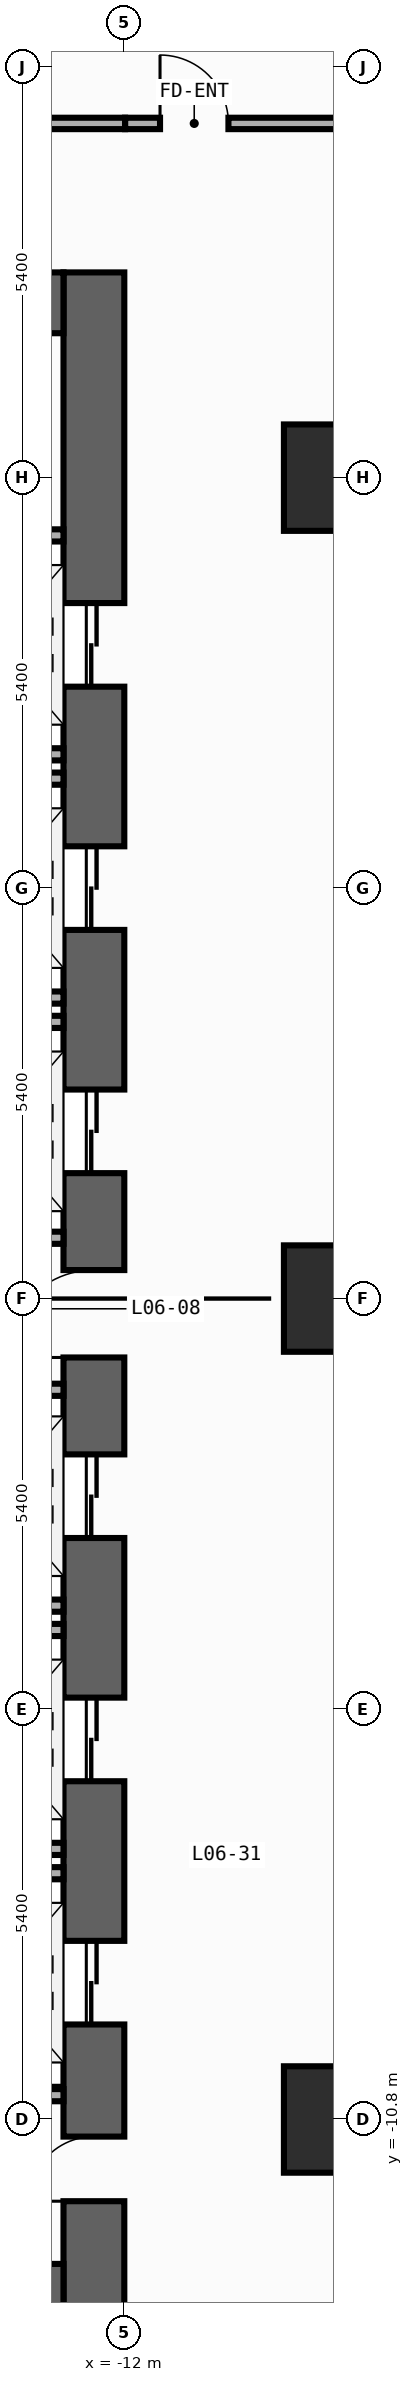
"""IFC4 building model, lengths in metres.
Left out: names, types, materials, properties, quantities, classifications, styles, units other than length and angle.
Written with IfcOpenShell. Run it as: python <this file> out.ifc"""

import sys

from ifc_helpers import new_model, si_unit, direction, frame, frame_2d, origin, origin_2d, place, context, subcontext, project, spatial, rectangle, extrude, element, fill, save


model = new_model("IFC4")
c1 = context("Model", 3, precision=1e-05, world=origin(), true_north=direction((0.0, 1.0)))
c2 = subcontext(c1, "Body", "Model", "MODEL_VIEW")
j1 = project(units=[si_unit("LENGTHUNIT", "METRE"), si_unit("PLANEANGLEUNIT", "RADIAN")], contexts=[c1])
p1 = place(None, origin())
s1 = spatial("IfcSite", under=j1, at=p1, CompositionType="ELEMENT")
p2 = place(p1, origin())
s2 = spatial("IfcBuilding", under=s1, at=p2, CompositionType="ELEMENT")
p3 = place(p2, frame((0.0, 0.0, 26.0)))
s3 = spatial("IfcBuildingStorey", under=s2, at=p3, CompositionType="ELEMENT", Elevation=26.0)
p4 = place(p3, frame((-12.4, -13.5, 0.0), z_axis=(0.0, 0.0, 1.0), x_axis=(0.0, 1.0, 0.0)))
e1 = element("IfcWall", 1, at=p4, inside=s3, PredefinedType="SHEAR", context=c2, shape_type="SweptSolid", body=[
    extrude(rectangle(XDim=27.0, YDim=0.8, at=frame_2d((13.5, 0.0))), origin(), (0.0, 0.0, 1.0), 3.94),
])
p5 = place(p4, frame((21.55, 0.0, 0.0)))
e2 = element("IfcOpeningElement", 2, at=p5, cuts=e1, PredefinedType="OPENING", context=c2, shape_type="SweptSolid", body=[
    extrude(rectangle(XDim=1.1, YDim=2.2, at=frame_2d((0.55, 1.1))), frame((0.0, 0.41, 0.0), z_axis=(0.0, -1.0, 0.0), x_axis=(1.0, 0.0, 0.0)), (0.0, 0.0, 1.0), 0.82),
])
p6 = place(p4, frame((18.35, 0.0, 0.0)))
e3 = element("IfcOpeningElement", 3, at=p6, cuts=e1, PredefinedType="OPENING", context=c2, shape_type="SweptSolid", body=[
    extrude(rectangle(XDim=1.1, YDim=2.2, at=frame_2d((0.55, 1.1))), frame((0.0, 0.41, 0.0), z_axis=(0.0, -1.0, 0.0), x_axis=(1.0, 0.0, 0.0)), (0.0, 0.0, 1.0), 0.82),
])
p7 = place(p4, frame((15.15, 0.0, 0.0)))
e4 = element("IfcOpeningElement", 4, at=p7, cuts=e1, PredefinedType="OPENING", context=c2, shape_type="SweptSolid", body=[
    extrude(rectangle(XDim=1.1, YDim=2.2, at=frame_2d((0.55, 1.1))), frame((0.0, 0.41, 0.0), z_axis=(0.0, -1.0, 0.0), x_axis=(1.0, 0.0, 0.0)), (0.0, 0.0, 1.0), 0.82),
])
p8 = place(p4, frame((10.35, 0.0, 0.0)))
e5 = element("IfcOpeningElement", 5, at=p8, cuts=e1, PredefinedType="OPENING", context=c2, shape_type="SweptSolid", body=[
    extrude(rectangle(XDim=1.1, YDim=2.2, at=frame_2d((0.55, 1.1))), frame((0.0, 0.41, 0.0), z_axis=(0.0, -1.0, 0.0), x_axis=(1.0, 0.0, 0.0)), (0.0, 0.0, 1.0), 0.82),
])
p9 = place(p4, frame((7.15, 0.0, 0.0)))
e6 = element("IfcOpeningElement", 6, at=p9, cuts=e1, PredefinedType="OPENING", context=c2, shape_type="SweptSolid", body=[
    extrude(rectangle(XDim=1.1, YDim=2.2, at=frame_2d((0.55, 1.1))), frame((0.0, 0.41, 0.0), z_axis=(0.0, -1.0, 0.0), x_axis=(1.0, 0.0, 0.0)), (0.0, 0.0, 1.0), 0.82),
])
p10 = place(p4, frame((3.95, 0.0, 0.0)))
e7 = element("IfcOpeningElement", 7, at=p10, cuts=e1, PredefinedType="OPENING", context=c2, shape_type="SweptSolid", body=[
    extrude(rectangle(XDim=1.1, YDim=2.2, at=frame_2d((0.55, 1.1))), frame((0.0, 0.41, 0.0), z_axis=(0.0, -1.0, 0.0), x_axis=(1.0, 0.0, 0.0)), (0.0, 0.0, 1.0), 0.82),
])
p11 = place(p4, frame((12.725, 0.0, 0.0)))
e8 = element("IfcOpeningElement", 8, at=p11, cuts=e1, PredefinedType="OPENING", context=c2, shape_type="SweptSolid", body=[
    extrude(rectangle(XDim=1.15, YDim=2.2, at=frame_2d((0.575, 1.1))), frame((0.0, 0.41, 0.0), z_axis=(0.0, -1.0, 0.0), x_axis=(1.0, 0.0, 0.0)), (0.0, 0.0, 1.0), 0.82),
])
p12 = place(p4, frame((1.625, 0.0, 0.0)))
e9 = element("IfcOpeningElement", 9, at=p12, cuts=e1, PredefinedType="OPENING", context=c2, shape_type="SweptSolid", body=[
    extrude(rectangle(XDim=0.85, YDim=2.1, at=frame_2d((0.425, 1.05))), frame((0.0, 0.41, 0.0), z_axis=(0.0, -1.0, 0.0), x_axis=(1.0, 0.0, 0.0)), (0.0, 0.0, 1.0), 0.82),
])
for number, where, z_axis, x_axis in (
    (10, (-19.6, -13.1, 0.0), (0.0, 0.0, 1.0), (1.0, 0.0, 0.0)),
    (11, (-19.6, 13.1, 0.0), (0.0, 0.0, 1.0), (1.0, 0.0, 0.0)),
):
    element("IfcWall", number, at=place(p3, frame(where, z_axis=z_axis, x_axis=x_axis)), inside=s3, PredefinedType="SHEAR", context=c2, shape_type="SweptSolid", body=[
        extrude(rectangle(XDim=6.8, YDim=0.8, at=frame_2d((3.4, 0.0))), origin(), (0.0, 0.0, 1.0), 3.94),
    ])
for number, where, z_axis, x_axis in (
    (12, (-9.2, -10.8, 0.0), (0.0, 0.0, 1.0), (1.0, 0.0, 0.0)),
    (13, (-9.2, 0.0, 0.0), (0.0, 0.0, 1.0), (1.0, 0.0, 0.0)),
    (14, (-9.2, 10.8, 0.0), (0.0, 0.0, 1.0), (1.0, 0.0, 0.0)),
):
    element("IfcColumn", number, at=place(p3, frame(where, z_axis=z_axis, x_axis=x_axis)), inside=s3, PredefinedType="COLUMN", context=c2, shape_type="SweptSolid", body=[
        extrude(rectangle(XDim=1.4, YDim=1.4, at=origin_2d()), origin(), (0.0, 0.0, 1.0), 4.2),
    ])
for number, where, z_axis, x_axis in (
    (15, (-14.99, 7.16, 0.0), (0.0, 0.0, 1.0), (1.0, 0.0, 0.0)),
    (16, (-14.99, 10.04, 0.0), (0.0, 0.0, 1.0), (1.0, 0.0, 0.0)),
    (17, (-14.99, 3.96, 0.0), (0.0, 0.0, 1.0), (1.0, 0.0, 0.0)),
    (18, (-14.99, 6.84, 0.0), (0.0, 0.0, 1.0), (1.0, 0.0, 0.0)),
    (19, (-14.99, 3.64, 0.0), (0.0, 0.0, 1.0), (1.0, 0.0, 0.0)),
    (20, (-14.99, -4.04, 0.0), (0.0, 0.0, 1.0), (1.0, 0.0, 0.0)),
    (21, (-14.99, -7.24, 0.0), (0.0, 0.0, 1.0), (1.0, 0.0, 0.0)),
    (22, (-14.99, -4.36, 0.0), (0.0, 0.0, 1.0), (1.0, 0.0, 0.0)),
    (23, (-14.99, -7.56, 0.0), (0.0, 0.0, 1.0), (1.0, 0.0, 0.0)),
):
    element("IfcWall", number, at=place(p3, frame(where, z_axis=z_axis, x_axis=x_axis)), inside=s3, PredefinedType="STANDARD", context=c2, shape_type="SweptSolid", body=[
        extrude(rectangle(XDim=2.19, YDim=0.16, at=frame_2d((1.095, 0.0))), origin(), (0.0, 0.0, 1.0), 3.94),
    ])
for number, where, z_axis, x_axis in (
    (24, (-15.4, 0.8, 0.0), (0.0, 0.0, 1.0), (1.0, 0.0, 0.0)),
    (25, (-15.4, -1.2, 0.0), (0.0, 0.0, 1.0), (1.0, 0.0, 0.0)),
    (26, (-15.4, -10.48, 0.0), (0.0, 0.0, 1.0), (1.0, 0.0, 0.0)),
):
    element("IfcWall", number, at=place(p3, frame(where, z_axis=z_axis, x_axis=x_axis)), inside=s3, PredefinedType="STANDARD", context=c2, shape_type="SweptSolid", body=[
        extrude(rectangle(XDim=2.6, YDim=0.16, at=frame_2d((1.3, 0.0))), origin(), (0.0, 0.0, 1.0), 3.94),
    ])
p13 = place(p3, frame((-11.99, 15.46, 0.0), z_axis=(0.0, 0.0, 1.0), x_axis=(1.0, 0.0, 0.0)))
e27 = element("IfcWall", 27, at=p13, inside=s3, PredefinedType="PARTITIONING", context=c2, shape_type="SweptSolid", body=[
    extrude(rectangle(XDim=3.35, YDim=0.15, at=frame_2d((1.675, 0.0))), origin(), (0.0, 0.0, 1.0), 3.94),
])
p14 = place(p13, frame((0.46, 0.0, 0.0)))
e28 = element("IfcOpeningElement", 28, at=p14, cuts=e27, PredefinedType="OPENING", context=c2, shape_type="SweptSolid", body=[
    extrude(rectangle(XDim=0.9, YDim=2.15, at=frame_2d((0.45, 1.075))), frame((0.0, 0.085, 0.0), z_axis=(0.0, -1.0, 0.0), x_axis=(1.0, 0.0, 0.0)), (0.0, 0.0, 1.0), 0.17),
])
p15 = place(p3, frame((-20.64, 15.46, 0.0), z_axis=(0.0, 0.0, 1.0), x_axis=(1.0, 0.0, 0.0)))
e29 = element("IfcWall", 29, at=p15, inside=s3, PredefinedType="PARTITIONING", context=c2, shape_type="SweptSolid", body=[
    extrude(rectangle(XDim=8.65, YDim=0.15, at=frame_2d((4.325, 0.0))), origin(), (0.0, 0.0, 1.0), 3.94),
])
p16 = place(p15, frame((2.871, 0.0, 0.0)))
e30 = element("IfcOpeningElement", 30, at=p16, cuts=e29, PredefinedType="OPENING", context=c2, shape_type="SweptSolid", body=[
    extrude(rectangle(XDim=0.9, YDim=2.15, at=frame_2d((0.45, 1.075))), frame((0.0, 0.085, 0.0), z_axis=(0.0, -1.0, 0.0), x_axis=(1.0, 0.0, 0.0)), (0.0, 0.0, 1.0), 0.17),
])
p17 = place(p5, origin())
e31 = element("IfcDoor", 31, at=p17, inside=s3, OperationType="DOUBLE_DOOR_SLIDING", PredefinedType="DOOR", context=c2, shape_type="SweptSolid", body=[
    extrude(rectangle(XDim=1.1, YDim=2.2, at=frame_2d((0.55, 1.1))), frame((0.0, 0.025, 0.0), z_axis=(0.0, -1.0, 0.0), x_axis=(1.0, 0.0, 0.0)), (0.0, 0.0, 1.0), 0.05),
])
fill(e2, e31)
p18 = place(p6, origin())
e32 = element("IfcDoor", 32, at=p18, inside=s3, OperationType="DOUBLE_DOOR_SLIDING", PredefinedType="DOOR", context=c2, shape_type="SweptSolid", body=[
    extrude(rectangle(XDim=1.1, YDim=2.2, at=frame_2d((0.55, 1.1))), frame((0.0, 0.025, 0.0), z_axis=(0.0, -1.0, 0.0), x_axis=(1.0, 0.0, 0.0)), (0.0, 0.0, 1.0), 0.05),
])
fill(e3, e32)
p19 = place(p7, origin())
e33 = element("IfcDoor", 33, at=p19, inside=s3, OperationType="DOUBLE_DOOR_SLIDING", PredefinedType="DOOR", context=c2, shape_type="SweptSolid", body=[
    extrude(rectangle(XDim=1.1, YDim=2.2, at=frame_2d((0.55, 1.1))), frame((0.0, 0.025, 0.0), z_axis=(0.0, -1.0, 0.0), x_axis=(1.0, 0.0, 0.0)), (0.0, 0.0, 1.0), 0.05),
])
fill(e4, e33)
p20 = place(p8, origin())
e34 = element("IfcDoor", 34, at=p20, inside=s3, OperationType="DOUBLE_DOOR_SLIDING", PredefinedType="DOOR", context=c2, shape_type="SweptSolid", body=[
    extrude(rectangle(XDim=1.1, YDim=2.2, at=frame_2d((0.55, 1.1))), frame((0.0, 0.025, 0.0), z_axis=(0.0, -1.0, 0.0), x_axis=(1.0, 0.0, 0.0)), (0.0, 0.0, 1.0), 0.05),
])
fill(e5, e34)
p21 = place(p9, origin())
e35 = element("IfcDoor", 35, at=p21, inside=s3, OperationType="DOUBLE_DOOR_SLIDING", PredefinedType="DOOR", context=c2, shape_type="SweptSolid", body=[
    extrude(rectangle(XDim=1.1, YDim=2.2, at=frame_2d((0.55, 1.1))), frame((0.0, 0.025, 0.0), z_axis=(0.0, -1.0, 0.0), x_axis=(1.0, 0.0, 0.0)), (0.0, 0.0, 1.0), 0.05),
])
fill(e6, e35)
p22 = place(p10, origin())
e36 = element("IfcDoor", 36, at=p22, inside=s3, OperationType="DOUBLE_DOOR_SLIDING", PredefinedType="DOOR", context=c2, shape_type="SweptSolid", body=[
    extrude(rectangle(XDim=1.1, YDim=2.2, at=frame_2d((0.55, 1.1))), frame((0.0, 0.025, 0.0), z_axis=(0.0, -1.0, 0.0), x_axis=(1.0, 0.0, 0.0)), (0.0, 0.0, 1.0), 0.05),
])
fill(e7, e36)
p23 = place(p11, origin())
e37 = element("IfcDoor", 37, at=p23, inside=s3, OperationType="SINGLE_SWING_LEFT", PredefinedType="DOOR", context=c2, shape_type="SweptSolid", body=[
    extrude(rectangle(XDim=1.15, YDim=2.2, at=frame_2d((0.575, 1.1))), frame((0.0, 0.025, 0.0), z_axis=(0.0, -1.0, 0.0), x_axis=(1.0, 0.0, 0.0)), (0.0, 0.0, 1.0), 0.05),
])
fill(e8, e37)
p24 = place(p12, origin())
e38 = element("IfcDoor", 38, at=p24, inside=s3, OperationType="SINGLE_SWING_LEFT", PredefinedType="DOOR", context=c2, shape_type="SweptSolid", body=[
    extrude(rectangle(XDim=0.85, YDim=2.1, at=frame_2d((0.425, 1.05))), frame((0.0, 0.025, 0.0), z_axis=(0.0, -1.0, 0.0), x_axis=(1.0, 0.0, 0.0)), (0.0, 0.0, 1.0), 0.05),
])
fill(e9, e38)
p25 = place(p14, origin())
e39 = element("IfcDoor", 39, at=p25, inside=s3, OperationType="SINGLE_SWING_LEFT", PredefinedType="DOOR", context=c2, shape_type="SweptSolid", body=[
    extrude(rectangle(XDim=0.9, YDim=2.15, at=frame_2d((0.45, 1.075))), frame((0.0, 0.025, 0.0), z_axis=(0.0, -1.0, 0.0), x_axis=(1.0, 0.0, 0.0)), (0.0, 0.0, 1.0), 0.05),
])
fill(e28, e39)
save(model, sys.argv[1])
